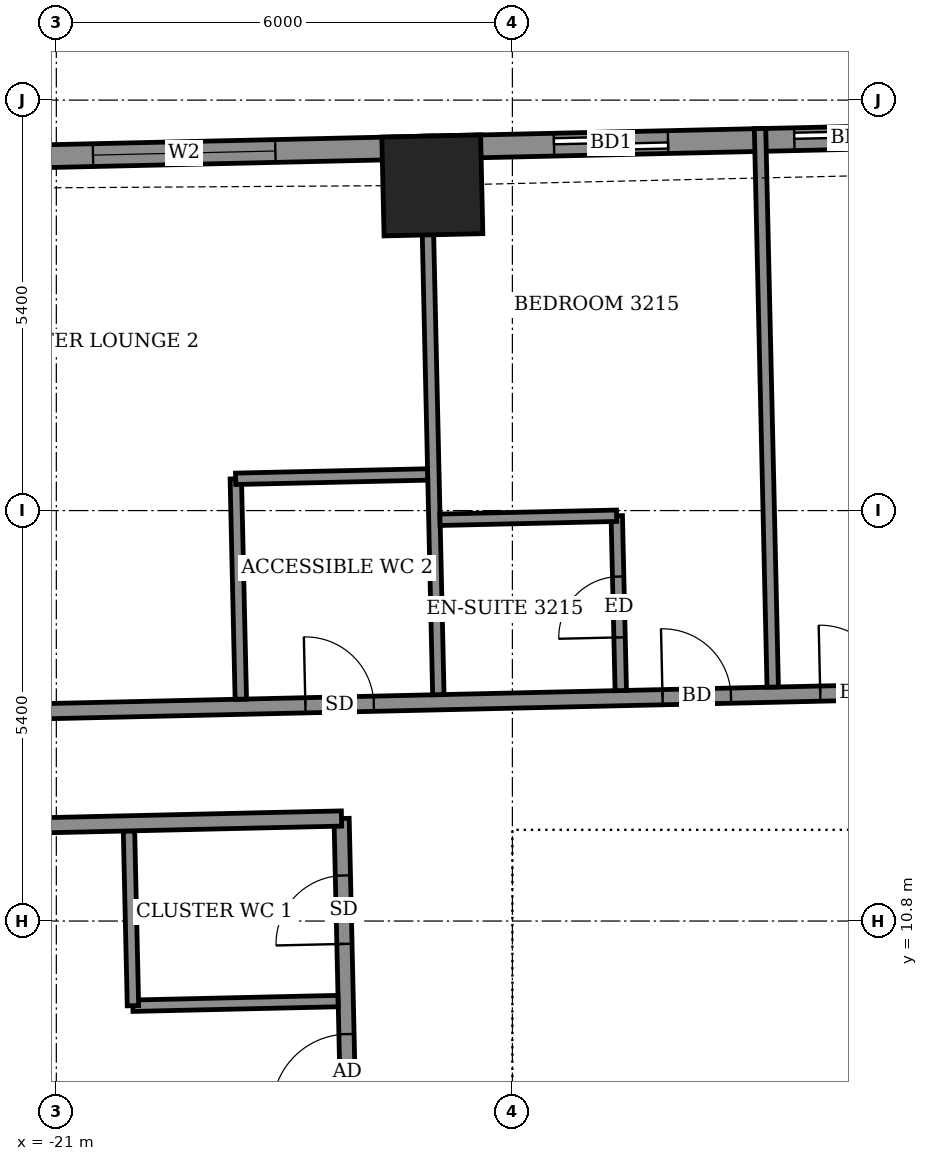
"""IFC4 building model, lengths in metres.
Left out: names, types, materials, properties, quantities, classifications, styles, units other than length and angle.
Written with IfcOpenShell. Run it as: python <this file> out.ifc"""

import sys

from ifc_helpers import new_model, si_unit, direction, frame, frame_2d, origin, origin_2d, place, context, subcontext, project, spatial, rectangle, extrude, element, fill, save


model = new_model("IFC4")
c1 = context("Model", 3, precision=1e-05, world=origin(), true_north=direction((0.0, 1.0)))
c2 = subcontext(c1, "Body", "Model", "MODEL_VIEW")
j1 = project(units=[si_unit("LENGTHUNIT", "METRE"), si_unit("PLANEANGLEUNIT", "RADIAN")], contexts=[c1])
p1 = place(None, origin())
s1 = spatial("IfcSite", under=j1, at=p1, CompositionType="ELEMENT")
p2 = place(p1, origin())
s2 = spatial("IfcBuilding", under=s1, at=p2, CompositionType="ELEMENT")
p3 = place(p2, frame((0.0, 0.0, 130.1)))
s3 = spatial("IfcBuildingStorey", under=s2, at=p3, CompositionType="ELEMENT", Elevation=130.1)
p4 = place(p3, frame((-16.053, 20.478, -0.55), z_axis=(0.0, 0.0, 1.0), x_axis=(-0.99974302967, -0.022668802943, 0.0)))
e1 = element("IfcColumn", 1, at=p4, inside=s3, PredefinedType="COLUMN", context=c2, shape_type="SweptSolid", body=[
    extrude(rectangle(XDim=1.3, YDim=1.3, at=origin_2d()), origin(), (0.0, 0.0, 1.0), 3.6),
])
p5 = place(p3, frame((19.396, 21.782, 0.0), z_axis=(0.0, 0.0, 1.0), x_axis=(-0.999742636707, -0.022686126826, 0.0)))
e2 = element("IfcWall", 2, at=p5, inside=s3, PredefinedType="SOLIDWALL", context=c2, shape_type="SweptSolid", body=[
    extrude(rectangle(XDim=42.444, YDim=0.3, at=frame_2d((21.222, 0.0))), origin(), (0.0, 0.0, 1.0), 3.05),
])
p6 = place(p5, frame((1.982, 0.0, 0.0)))
e3 = element("IfcOpeningElement", 3, at=p6, cuts=e2, PredefinedType="OPENING", context=c2, shape_type="SweptSolid", body=[
    extrude(rectangle(XDim=1.5, YDim=2.4, at=frame_2d((0.75, 1.2))), frame((0.0, 0.16, 0.0), z_axis=(0.0, -1.0, 0.0), x_axis=(1.0, 0.0, 0.0)), (0.0, 0.0, 1.0), 0.32),
])
p7 = place(p5, frame((5.009, 0.0, 0.0)))
e4 = element("IfcOpeningElement", 4, at=p7, cuts=e2, PredefinedType="OPENING", context=c2, shape_type="SweptSolid", body=[
    extrude(rectangle(XDim=1.2, YDim=2.4, at=frame_2d((0.6, 1.2))), frame((0.0, 0.16, 0.0), z_axis=(0.0, -1.0, 0.0), x_axis=(1.0, 0.0, 0.0)), (0.0, 0.0, 1.0), 0.32),
])
p8 = place(p5, frame((10.394, 0.0, 0.0)))
e5 = element("IfcOpeningElement", 5, at=p8, cuts=e2, PredefinedType="OPENING", context=c2, shape_type="SweptSolid", body=[
    extrude(rectangle(XDim=1.5, YDim=2.4, at=frame_2d((0.75, 1.2))), frame((0.0, 0.16, 0.0), z_axis=(0.0, -1.0, 0.0), x_axis=(1.0, 0.0, 0.0)), (0.0, 0.0, 1.0), 0.32),
])
p9 = place(p5, frame((15.346, 0.0, 0.0)))
e6 = element("IfcOpeningElement", 6, at=p9, cuts=e2, PredefinedType="OPENING", context=c2, shape_type="SweptSolid", body=[
    extrude(rectangle(XDim=1.5, YDim=2.4, at=frame_2d((0.75, 1.2))), frame((0.0, 0.16, 0.0), z_axis=(0.0, -1.0, 0.0), x_axis=(1.0, 0.0, 0.0)), (0.0, 0.0, 1.0), 0.32),
])
p10 = place(p5, frame((18.508, 0.0, 0.0)))
e7 = element("IfcOpeningElement", 7, at=p10, cuts=e2, PredefinedType="OPENING", context=c2, shape_type="SweptSolid", body=[
    extrude(rectangle(XDim=1.5, YDim=2.4, at=frame_2d((0.75, 1.2))), frame((0.0, 0.16, 0.0), z_axis=(0.0, -1.0, 0.0), x_axis=(1.0, 0.0, 0.0)), (0.0, 0.0, 1.0), 0.32),
])
p11 = place(p5, frame((23.544, 0.0, 0.0)))
e8 = element("IfcOpeningElement", 8, at=p11, cuts=e2, PredefinedType="OPENING", context=c2, shape_type="SweptSolid", body=[
    extrude(rectangle(XDim=1.5, YDim=2.4, at=frame_2d((0.75, 1.2))), frame((0.0, 0.16, 0.0), z_axis=(0.0, -1.0, 0.0), x_axis=(1.0, 0.0, 0.0)), (0.0, 0.0, 1.0), 0.32),
])
p12 = place(p5, frame((29.195, 0.0, 0.0)))
e9 = element("IfcOpeningElement", 9, at=p12, cuts=e2, PredefinedType="OPENING", context=c2, shape_type="SweptSolid", body=[
    extrude(rectangle(XDim=1.5, YDim=2.4, at=frame_2d((0.75, 1.2))), frame((0.0, 0.16, 0.0), z_axis=(0.0, -1.0, 0.0), x_axis=(1.0, 0.0, 0.0)), (0.0, 0.0, 1.0), 0.32),
])
p13 = place(p5, frame((32.357, 0.0, 0.0)))
e10 = element("IfcOpeningElement", 10, at=p13, cuts=e2, PredefinedType="OPENING", context=c2, shape_type="SweptSolid", body=[
    extrude(rectangle(XDim=1.5, YDim=2.4, at=frame_2d((0.75, 1.2))), frame((0.0, 0.16, 0.0), z_axis=(0.0, -1.0, 0.0), x_axis=(1.0, 0.0, 0.0)), (0.0, 0.0, 1.0), 0.32),
])
p14 = place(p5, frame((37.524, 0.0, 0.9)))
e11 = element("IfcOpeningElement", 11, at=p14, cuts=e2, PredefinedType="OPENING", context=c2, shape_type="SweptSolid", body=[
    extrude(rectangle(XDim=2.4, YDim=1.5, at=frame_2d((1.2, 0.75))), frame((0.0, 0.16, 0.0), z_axis=(0.0, -1.0, 0.0), x_axis=(1.0, 0.0, 0.0)), (0.0, 0.0, 1.0), 0.32),
])
p15 = place(p3, frame((-16.603, -16.218, 0.0), z_axis=(0.0, 0.0, 1.0), x_axis=(-0.022698146637, 0.999742363881, 0.0)))
e12 = element("IfcWall", 12, at=p15, inside=s3, PredefinedType="PARTITIONING", context=c2, shape_type="SweptSolid", body=[
    extrude(rectangle(XDim=28.374, YDim=0.2, at=frame_2d((14.187, 0.0))), origin(), (0.0, 0.0, 1.0), 3.05),
])
p16 = place(p15, frame((24.537, 0.0, 0.0)))
e13 = element("IfcOpeningElement", 13, at=p16, cuts=e12, PredefinedType="OPENING", context=c2, shape_type="SweptSolid", body=[
    extrude(rectangle(XDim=1.0, YDim=2.1, at=frame_2d((0.5, 1.05))), frame((0.0, 0.11, 0.0), z_axis=(0.0, -1.0, 0.0), x_axis=(1.0, 0.0, 0.0)), (0.0, 0.0, 1.0), 0.22),
])
p17 = place(p15, frame((26.724, 0.0, 0.0)))
e14 = element("IfcOpeningElement", 14, at=p17, cuts=e12, PredefinedType="OPENING", context=c2, shape_type="SweptSolid", body=[
    extrude(rectangle(XDim=0.9, YDim=2.1, at=frame_2d((0.45, 1.05))), frame((0.0, 0.11, 0.0), z_axis=(0.0, -1.0, 0.0), x_axis=(1.0, 0.0, 0.0)), (0.0, 0.0, 1.0), 0.22),
])
p18 = place(p15, frame((22.099, 0.0, 0.0)))
e15 = element("IfcOpeningElement", 15, at=p18, cuts=e12, PredefinedType="OPENING", context=c2, shape_type="SweptSolid", body=[
    extrude(rectangle(XDim=1.0, YDim=2.1, at=frame_2d((0.5, 1.05))), frame((0.0, 0.11, 0.0), z_axis=(0.0, -1.0, 0.0), x_axis=(1.0, 0.0, 0.0)), (0.0, 0.0, 1.0), 0.22),
])
p19 = place(p15, frame((16.324, 0.0, 0.0)))
e16 = element("IfcOpeningElement", 16, at=p19, cuts=e12, PredefinedType="OPENING", context=c2, shape_type="SweptSolid", body=[
    extrude(rectangle(XDim=1.0, YDim=2.1, at=frame_2d((0.5, 1.05))), frame((0.0, 0.11, 0.0), z_axis=(0.0, -1.0, 0.0), x_axis=(1.0, 0.0, 0.0)), (0.0, 0.0, 1.0), 0.22),
])
p20 = place(p15, frame((19.449, 0.0, 0.0)))
e17 = element("IfcOpeningElement", 17, at=p20, cuts=e12, PredefinedType="OPENING", context=c2, shape_type="SweptSolid", body=[
    extrude(rectangle(XDim=0.9, YDim=2.1, at=frame_2d((0.45, 1.05))), frame((0.0, 0.11, 0.0), z_axis=(0.0, -1.0, 0.0), x_axis=(1.0, 0.0, 0.0)), (0.0, 0.0, 1.0), 0.22),
])
p21 = place(p15, frame((13.574, 0.0, 0.0)))
e18 = element("IfcOpeningElement", 18, at=p21, cuts=e12, PredefinedType="OPENING", context=c2, shape_type="SweptSolid", body=[
    extrude(rectangle(XDim=1.0, YDim=2.1, at=frame_2d((0.5, 1.05))), frame((0.0, 0.11, 0.0), z_axis=(0.0, -1.0, 0.0), x_axis=(1.0, 0.0, 0.0)), (0.0, 0.0, 1.0), 0.22),
])
p22 = place(p15, frame((11.449, 0.0, 0.0)))
e19 = element("IfcOpeningElement", 19, at=p22, cuts=e12, PredefinedType="OPENING", context=c2, shape_type="SweptSolid", body=[
    extrude(rectangle(XDim=0.9, YDim=2.1, at=frame_2d((0.45, 1.05))), frame((0.0, 0.11, 0.0), z_axis=(0.0, -1.0, 0.0), x_axis=(1.0, 0.0, 0.0)), (0.0, 0.0, 1.0), 0.22),
])
p23 = place(p15, frame((8.524, 0.0, 0.0)))
e20 = element("IfcOpeningElement", 20, at=p23, cuts=e12, PredefinedType="OPENING", context=c2, shape_type="SweptSolid", body=[
    extrude(rectangle(XDim=1.0, YDim=2.1, at=frame_2d((0.5, 1.05))), frame((0.0, 0.11, 0.0), z_axis=(0.0, -1.0, 0.0), x_axis=(1.0, 0.0, 0.0)), (0.0, 0.0, 1.0), 0.22),
])
p24 = place(p15, frame((5.325, 0.0, 0.0)))
e21 = element("IfcOpeningElement", 21, at=p24, cuts=e12, PredefinedType="OPENING", context=c2, shape_type="SweptSolid", body=[
    extrude(rectangle(XDim=1.0, YDim=2.1, at=frame_2d((0.5, 1.05))), frame((0.0, 0.11, 0.0), z_axis=(0.0, -1.0, 0.0), x_axis=(1.0, 0.0, 0.0)), (0.0, 0.0, 1.0), 0.22),
])
p25 = place(p15, frame((2.85, 0.0, 0.0)))
e22 = element("IfcOpeningElement", 22, at=p25, cuts=e12, PredefinedType="OPENING", context=c2, shape_type="SweptSolid", body=[
    extrude(rectangle(XDim=1.0, YDim=2.1, at=frame_2d((0.5, 1.05))), frame((0.0, 0.11, 0.0), z_axis=(0.0, -1.0, 0.0), x_axis=(1.0, 0.0, 0.0)), (0.0, 0.0, 1.0), 0.22),
])
p26 = place(p15, frame((0.75, 0.0, 0.0)))
e23 = element("IfcOpeningElement", 23, at=p26, cuts=e12, PredefinedType="OPENING", context=c2, shape_type="SweptSolid", body=[
    extrude(rectangle(XDim=0.9, YDim=2.1, at=frame_2d((0.45, 1.05))), frame((0.0, 0.11, 0.0), z_axis=(0.0, -1.0, 0.0), x_axis=(1.0, 0.0, 0.0)), (0.0, 0.0, 1.0), 0.22),
])
p27 = place(p3, frame((-19.993, 9.686, 0.0), z_axis=(0.0, 0.0, 1.0), x_axis=(0.999744396973, 0.02260842146, 0.0)))
e24 = element("IfcWall", 24, at=p27, inside=s3, PredefinedType="PARTITIONING", context=c2, shape_type="SweptSolid", body=[
    extrude(rectangle(XDim=2.7, YDim=0.15, at=frame_2d((1.35, 0.0))), origin(), (0.0, 0.0, 1.0), 3.05),
])
p28 = place(p3, frame((-19.992, 9.686, 0.0), z_axis=(0.0, 0.0, 1.0), x_axis=(-0.022612884682, 0.999744296031, 0.0)))
e25 = element("IfcWall", 25, at=p28, inside=s3, PredefinedType="PARTITIONING", context=c2, shape_type="SweptSolid", body=[
    extrude(rectangle(XDim=2.3, YDim=0.15, at=frame_2d((1.15, 0.0))), origin(), (0.0, 0.0, 1.0), 3.05),
])
p29 = place(p3, frame((-26.387, 11.941, 0.0), z_axis=(0.0, 0.0, 1.0), x_axis=(0.999741076645, 0.022754772455, 0.0)))
e26 = element("IfcWall", 26, at=p29, inside=s3, PredefinedType="PARTITIONING", context=c2, shape_type="SweptSolid", body=[
    extrude(rectangle(XDim=9.141, YDim=0.2, at=frame_2d((4.571, 0.0))), origin(), (0.0, 0.0, 1.0), 3.05),
])
p30 = place(p3, frame((-26.421, 13.441, 0.0), z_axis=(0.0, 0.0, 1.0), x_axis=(0.999742754064, 0.022680954485, 0.0)))
e27 = element("IfcWall", 27, at=p30, inside=s3, PredefinedType="PARTITIONING", context=c2, shape_type="SweptSolid", body=[
    extrude(rectangle(XDim=48.945, YDim=0.2, at=frame_2d((24.472, 0.0))), origin(), (0.0, 0.0, 1.0), 3.05),
])
p31 = place(p30, frame((46.647, 0.0, 0.0)))
e28 = element("IfcOpeningElement", 28, at=p31, cuts=e27, PredefinedType="OPENING", context=c2, shape_type="SweptSolid", body=[
    extrude(rectangle(XDim=1.0, YDim=2.1, at=frame_2d((0.5, 1.05))), frame((0.0, 0.11, 0.0), z_axis=(0.0, -1.0, 0.0), x_axis=(1.0, 0.0, 0.0)), (0.0, 0.0, 1.0), 0.22),
])
p32 = place(p30, frame((42.2, 0.0, 0.0)))
e29 = element("IfcOpeningElement", 29, at=p32, cuts=e27, PredefinedType="OPENING", context=c2, shape_type="SweptSolid", body=[
    extrude(rectangle(XDim=0.9, YDim=2.1, at=frame_2d((0.45, 1.05))), frame((0.0, 0.11, 0.0), z_axis=(0.0, -1.0, 0.0), x_axis=(1.0, 0.0, 0.0)), (0.0, 0.0, 1.0), 0.22),
])
p33 = place(p30, frame((39.925, 0.0, 0.0)))
e30 = element("IfcOpeningElement", 30, at=p33, cuts=e27, PredefinedType="OPENING", context=c2, shape_type="SweptSolid", body=[
    extrude(rectangle(XDim=0.9, YDim=2.1, at=frame_2d((0.45, 1.05))), frame((0.0, 0.11, 0.0), z_axis=(0.0, -1.0, 0.0), x_axis=(1.0, 0.0, 0.0)), (0.0, 0.0, 1.0), 0.22),
])
p34 = place(p30, frame((33.2, 0.0, 0.0)))
e31 = element("IfcOpeningElement", 31, at=p34, cuts=e27, PredefinedType="OPENING", context=c2, shape_type="SweptSolid", body=[
    extrude(rectangle(XDim=0.9, YDim=2.1, at=frame_2d((0.45, 1.05))), frame((0.0, 0.11, 0.0), z_axis=(0.0, -1.0, 0.0), x_axis=(1.0, 0.0, 0.0)), (0.0, 0.0, 1.0), 0.22),
])
p35 = place(p30, frame((31.25, 0.0, 0.0)))
e32 = element("IfcOpeningElement", 32, at=p35, cuts=e27, PredefinedType="OPENING", context=c2, shape_type="SweptSolid", body=[
    extrude(rectangle(XDim=0.9, YDim=2.1, at=frame_2d((0.45, 1.05))), frame((0.0, 0.11, 0.0), z_axis=(0.0, -1.0, 0.0), x_axis=(1.0, 0.0, 0.0)), (0.0, 0.0, 1.0), 0.22),
])
p36 = place(p30, frame((24.5, 0.0, 0.0)))
e33 = element("IfcOpeningElement", 33, at=p36, cuts=e27, PredefinedType="OPENING", context=c2, shape_type="SweptSolid", body=[
    extrude(rectangle(XDim=0.9, YDim=2.1, at=frame_2d((0.45, 1.05))), frame((0.0, 0.11, 0.0), z_axis=(0.0, -1.0, 0.0), x_axis=(1.0, 0.0, 0.0)), (0.0, 0.0, 1.0), 0.22),
])
p37 = place(p30, frame((22.45, 0.0, 0.0)))
e34 = element("IfcOpeningElement", 34, at=p37, cuts=e27, PredefinedType="OPENING", context=c2, shape_type="SweptSolid", body=[
    extrude(rectangle(XDim=0.9, YDim=2.1, at=frame_2d((0.45, 1.05))), frame((0.0, 0.11, 0.0), z_axis=(0.0, -1.0, 0.0), x_axis=(1.0, 0.0, 0.0)), (0.0, 0.0, 1.0), 0.22),
])
p38 = place(p30, frame((15.475, 0.0, 0.0)))
e35 = element("IfcOpeningElement", 35, at=p38, cuts=e27, PredefinedType="OPENING", context=c2, shape_type="SweptSolid", body=[
    extrude(rectangle(XDim=0.9, YDim=2.1, at=frame_2d((0.45, 1.05))), frame((0.0, 0.11, 0.0), z_axis=(0.0, -1.0, 0.0), x_axis=(1.0, 0.0, 0.0)), (0.0, 0.0, 1.0), 0.22),
])
p39 = place(p30, frame((13.4, 0.0, 0.0)))
e36 = element("IfcOpeningElement", 36, at=p39, cuts=e27, PredefinedType="OPENING", context=c2, shape_type="SweptSolid", body=[
    extrude(rectangle(XDim=0.9, YDim=2.1, at=frame_2d((0.45, 1.05))), frame((0.0, 0.11, 0.0), z_axis=(0.0, -1.0, 0.0), x_axis=(1.0, 0.0, 0.0)), (0.0, 0.0, 1.0), 0.22),
])
p40 = place(p30, frame((2.725, 0.0, 0.0)))
e37 = element("IfcOpeningElement", 37, at=p40, cuts=e27, PredefinedType="OPENING", context=c2, shape_type="SweptSolid", body=[
    extrude(rectangle(XDim=1.0, YDim=2.1, at=frame_2d((0.5, 1.05))), frame((0.0, 0.11, 0.0), z_axis=(0.0, -1.0, 0.0), x_axis=(1.0, 0.0, 0.0)), (0.0, 0.0, 1.0), 0.22),
])
p41 = place(p30, frame((8.7, 0.0, 0.0)))
e38 = element("IfcOpeningElement", 38, at=p41, cuts=e27, PredefinedType="OPENING", context=c2, shape_type="SweptSolid", body=[
    extrude(rectangle(XDim=0.9, YDim=2.1, at=frame_2d((0.45, 1.05))), frame((0.0, 0.11, 0.0), z_axis=(0.0, -1.0, 0.0), x_axis=(1.0, 0.0, 0.0)), (0.0, 0.0, 1.0), 0.22),
])
p42 = place(p3, frame((-18.573, 13.719, 0.0), z_axis=(0.0, 0.0, 1.0), x_axis=(-0.022732880677, 0.999741574676, 0.0)))
e39 = element("IfcWall", 39, at=p42, inside=s3, PredefinedType="PARTITIONING", context=c2, shape_type="SweptSolid", body=[
    extrude(rectangle(XDim=2.9, YDim=0.15, at=frame_2d((1.45, 0.0))), origin(), (0.0, 0.0, 1.0), 3.05),
])
p43 = place(p3, frame((-15.974, 13.778, 0.0), z_axis=(0.0, 0.0, 1.0), x_axis=(-0.022554648976, 0.999745611548, 0.0)))
e40 = element("IfcWall", 40, at=p43, inside=s3, PredefinedType="PARTITIONING", context=c2, shape_type="SweptSolid", body=[
    extrude(rectangle(XDim=7.35, YDim=0.15, at=frame_2d((3.675, 0.0))), origin(), (0.0, 0.0, 1.0), 3.05),
])
p44 = place(p3, frame((-13.574, 13.832, 0.0), z_axis=(0.0, 0.0, 1.0), x_axis=(-0.023027540424, 0.999734831034, 0.0)))
e41 = element("IfcWall", 41, at=p44, inside=s3, PredefinedType="PARTITIONING", context=c2, shape_type="SweptSolid", body=[
    extrude(rectangle(XDim=2.301, YDim=0.15, at=frame_2d((1.15, 0.0))), origin(), (0.0, 0.0, 1.0), 3.05),
])
p45 = place(p44, frame((0.7, 0.0, 0.0)))
e42 = element("IfcOpeningElement", 42, at=p45, cuts=e41, PredefinedType="OPENING", context=c2, shape_type="SweptSolid", body=[
    extrude(rectangle(XDim=0.8, YDim=2.1, at=frame_2d((0.4, 1.05))), frame((0.0, 0.085, 0.0), z_axis=(0.0, -1.0, 0.0), x_axis=(1.0, 0.0, 0.0)), (0.0, 0.0, 1.0), 0.17),
])
p46 = place(p3, frame((-11.575, 13.878, 0.0), z_axis=(0.0, 0.0, 1.0), x_axis=(-0.022719896304, 0.99974186984, 0.0)))
e43 = element("IfcWall", 43, at=p46, inside=s3, PredefinedType="PARTITIONING", context=c2, shape_type="SweptSolid", body=[
    extrude(rectangle(XDim=7.35, YDim=0.15, at=frame_2d((3.675, 0.0))), origin(), (0.0, 0.0, 1.0), 2.55),
])
p47 = place(p3, frame((-15.953, 16.079, 0.0), z_axis=(0.0, 0.0, 1.0), x_axis=(0.999740260747, 0.02279059109, 0.0)))
e44 = element("IfcWall", 44, at=p47, inside=s3, PredefinedType="PARTITIONING", context=c2, shape_type="SweptSolid", body=[
    extrude(rectangle(XDim=2.324, YDim=0.15, at=frame_2d((1.162, 0.0))), origin(), (0.0, 0.0, 1.0), 3.05),
])
p48 = place(p3, frame((-18.641, 16.618, 0.0), z_axis=(0.0, 0.0, 1.0), x_axis=(0.999744175585, 0.022618209135, 0.0)))
e45 = element("IfcWall", 45, at=p48, inside=s3, PredefinedType="PARTITIONING", context=c2, shape_type="SweptSolid", body=[
    extrude(rectangle(XDim=2.526, YDim=0.15, at=frame_2d((1.263, 0.0))), origin(), (0.0, 0.0, 1.0), 3.05),
])
p49 = place(p3, frame((-14.8, 11.3, 0.0), z_axis=(0.0, 0.0, 1.0), x_axis=(1.0, 0.0, 0.0)))
e46 = element("IfcWall", 46, at=p49, inside=s3, PredefinedType="SHEAR", context=c2, shape_type="SweptSolid", body=[
    extrude(rectangle(XDim=29.6, YDim=1.0, at=frame_2d((14.8, 0.0))), origin(), (0.0, 0.0, 1.0), 3.6),
])
p50 = place(p3, frame((-14.3, -10.8, 0.0), z_axis=(0.0, 0.0, 1.0), x_axis=(0.0, 1.0, 0.0)))
e47 = element("IfcWall", 47, at=p50, inside=s3, PredefinedType="SHEAR", context=c2, shape_type="SweptSolid", body=[
    extrude(rectangle(XDim=21.6, YDim=1.0, at=frame_2d((10.8, 0.0))), origin(), (0.0, 0.0, 1.0), 3.6),
])
p51 = place(p50, frame((8.25, 0.0, 0.0)))
e48 = element("IfcOpeningElement", 48, at=p51, cuts=e47, PredefinedType="OPENING", context=c2, shape_type="SweptSolid", body=[
    extrude(rectangle(XDim=1.2, YDim=2.1, at=frame_2d((0.6, 1.05))), frame((0.0, 0.51, 0.0), z_axis=(0.0, -1.0, 0.0), x_axis=(1.0, 0.0, 0.0)), (0.0, 0.0, 1.0), 1.02),
])
p52 = place(p50, frame((15.25, 0.0, 0.0)))
e49 = element("IfcOpeningElement", 49, at=p52, cuts=e47, PredefinedType="OPENING", context=c2, shape_type="SweptSolid", body=[
    extrude(rectangle(XDim=1.2, YDim=2.1, at=frame_2d((0.6, 1.05))), frame((0.0, 0.51, 0.0), z_axis=(0.0, -1.0, 0.0), x_axis=(1.0, 0.0, 0.0)), (0.0, 0.0, 1.0), 1.02),
])
p53 = place(p3, frame((-10.8, 8.2, 0.0), z_axis=(0.0, 0.0, 1.0), x_axis=(0.0, 1.0, 0.0)))
e50 = element("IfcWall", 50, at=p53, inside=s3, PredefinedType="STANDARD", context=c2, shape_type="SweptSolid", body=[
    extrude(rectangle(XDim=2.6, YDim=0.2, at=frame_2d((1.3, 0.0))), origin(), (0.0, 0.0, 1.0), 3.05),
])
p54 = place(p12, origin())
e51 = element("IfcDoor", 51, at=p54, inside=s3, OperationType="SLIDING_TO_LEFT", PredefinedType="DOOR", context=c2, shape_type="SweptSolid", body=[
    extrude(rectangle(XDim=1.5, YDim=2.4, at=frame_2d((0.75, 1.2))), frame((0.0, 0.025, 0.0), z_axis=(0.0, -1.0, 0.0), x_axis=(1.0, 0.0, 0.0)), (0.0, 0.0, 1.0), 0.05),
])
fill(e9, e51)
p55 = place(p13, origin())
e52 = element("IfcDoor", 52, at=p55, inside=s3, OperationType="SLIDING_TO_LEFT", PredefinedType="DOOR", context=c2, shape_type="SweptSolid", body=[
    extrude(rectangle(XDim=1.5, YDim=2.4, at=frame_2d((0.75, 1.2))), frame((0.0, 0.025, 0.0), z_axis=(0.0, -1.0, 0.0), x_axis=(1.0, 0.0, 0.0)), (0.0, 0.0, 1.0), 0.05),
])
fill(e10, e52)
p56 = place(p14, origin())
e53 = element("IfcWindow", 53, at=p56, inside=s3, PartitioningType="DOUBLE_PANEL_VERTICAL", PredefinedType="WINDOW", context=c2, shape_type="SweptSolid", body=[
    extrude(rectangle(XDim=2.4, YDim=1.5, at=frame_2d((1.2, 0.75))), frame((0.0, 0.03, 0.0), z_axis=(0.0, -1.0, 0.0), x_axis=(1.0, 0.0, 0.0)), (0.0, 0.0, 1.0), 0.06),
])
fill(e11, e53)
p57 = place(p38, origin())
e54 = element("IfcDoor", 54, at=p57, inside=s3, OperationType="SINGLE_SWING_RIGHT", PredefinedType="DOOR", context=c2, shape_type="SweptSolid", body=[
    extrude(rectangle(XDim=0.9, YDim=2.1, at=frame_2d((0.45, 1.05))), frame((0.0, 0.025, 0.0), z_axis=(0.0, -1.0, 0.0), x_axis=(1.0, 0.0, 0.0)), (0.0, 0.0, 1.0), 0.05),
])
fill(e35, e54)
p58 = place(p39, origin())
e55 = element("IfcDoor", 55, at=p58, inside=s3, OperationType="SINGLE_SWING_LEFT", PredefinedType="DOOR", context=c2, shape_type="SweptSolid", body=[
    extrude(rectangle(XDim=0.9, YDim=2.1, at=frame_2d((0.45, 1.05))), frame((0.0, 0.025, 0.0), z_axis=(0.0, -1.0, 0.0), x_axis=(1.0, 0.0, 0.0)), (0.0, 0.0, 1.0), 0.05),
])
fill(e36, e55)
p59 = place(p45, origin())
e56 = element("IfcDoor", 56, at=p59, inside=s3, OperationType="SINGLE_SWING_LEFT", PredefinedType="DOOR", context=c2, shape_type="SweptSolid", body=[
    extrude(rectangle(XDim=0.8, YDim=2.1, at=frame_2d((0.4, 1.05))), frame((0.0, 0.025, 0.0), z_axis=(0.0, -1.0, 0.0), x_axis=(1.0, 0.0, 0.0)), (0.0, 0.0, 1.0), 0.05),
])
fill(e42, e56)
p60 = place(p41, origin())
e57 = element("IfcDoor", 57, at=p60, inside=s3, OperationType="SINGLE_SWING_RIGHT", PredefinedType="DOOR", context=c2, shape_type="SweptSolid", body=[
    extrude(rectangle(XDim=0.9, YDim=2.1, at=frame_2d((0.45, 1.05))), frame((0.0, 0.025, 0.0), z_axis=(0.0, -1.0, 0.0), x_axis=(1.0, 0.0, 0.0)), (0.0, 0.0, 1.0), 0.05),
])
fill(e38, e57)
p61 = place(p16, origin())
e58 = element("IfcDoor", 58, at=p61, inside=s3, OperationType="SINGLE_SWING_RIGHT", PredefinedType="DOOR", context=c2, shape_type="SweptSolid", body=[
    extrude(rectangle(XDim=1.0, YDim=2.1, at=frame_2d((0.5, 1.05))), frame((0.0, 0.025, 0.0), z_axis=(0.0, -1.0, 0.0), x_axis=(1.0, 0.0, 0.0)), (0.0, 0.0, 1.0), 0.05),
])
fill(e13, e58)
p62 = place(p17, origin())
e59 = element("IfcDoor", 59, at=p62, inside=s3, OperationType="SINGLE_SWING_LEFT", PredefinedType="DOOR", context=c2, shape_type="SweptSolid", body=[
    extrude(rectangle(XDim=0.9, YDim=2.1, at=frame_2d((0.45, 1.05))), frame((0.0, 0.025, 0.0), z_axis=(0.0, -1.0, 0.0), x_axis=(1.0, 0.0, 0.0)), (0.0, 0.0, 1.0), 0.05),
])
fill(e14, e59)
save(model, sys.argv[1])
